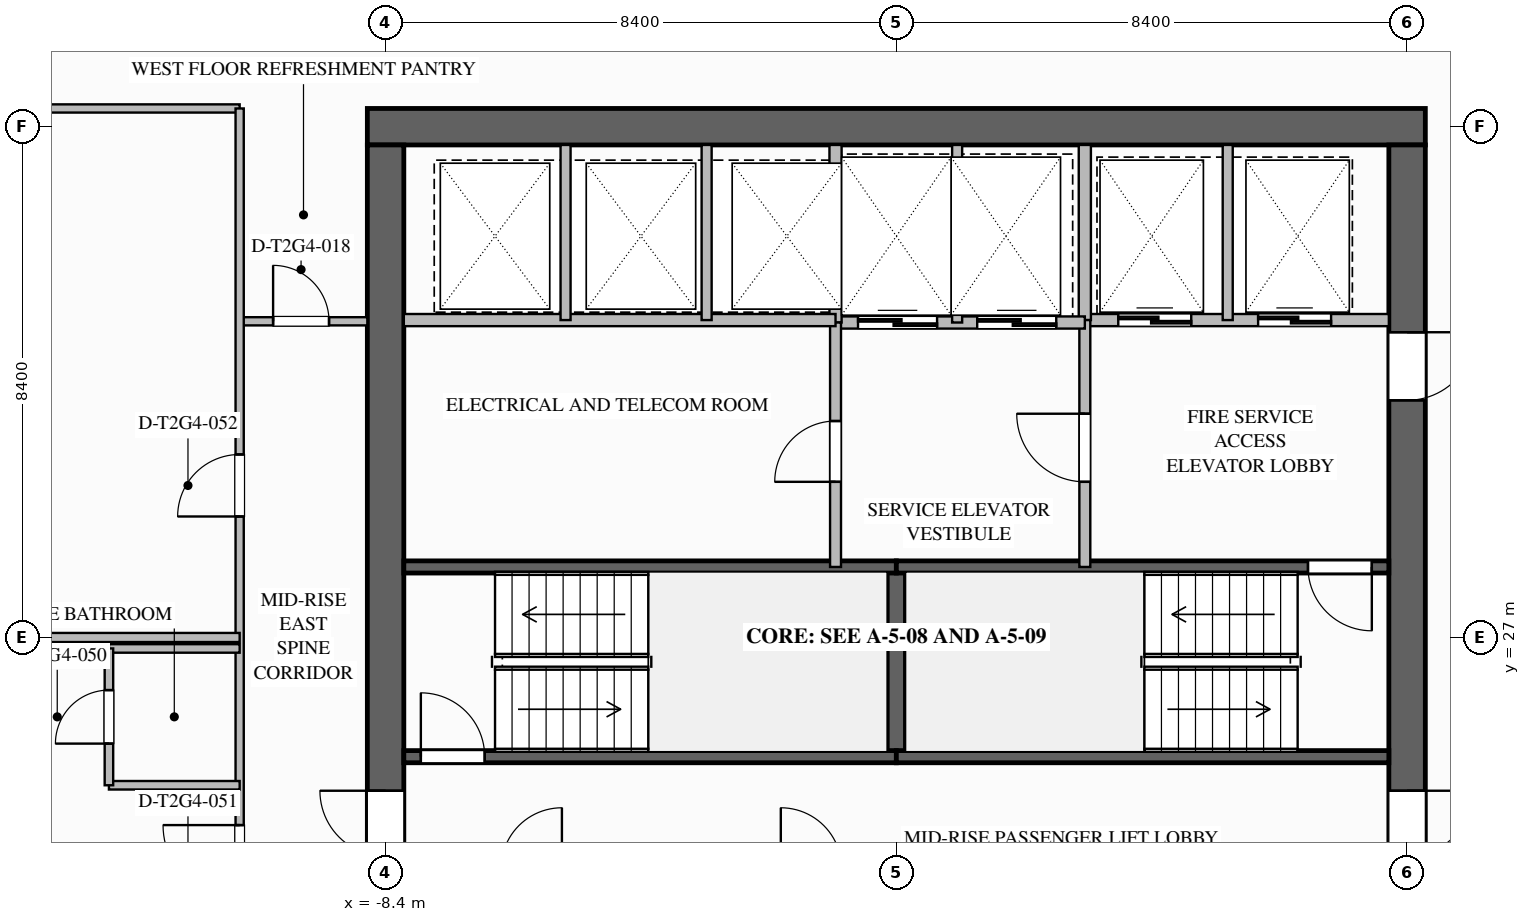
"""IFC4 building model, lengths in metres.
Left out: names, types, materials, properties, quantities, classifications, styles, units other than length and angle.
Written with IfcOpenShell. Run it as: python <this file> out.ifc"""

import sys

from ifc_helpers import new_model, si_unit, direction, frame, frame_2d, origin, place, context, subcontext, project, spatial, rectangle, extrude, element, fill, save


model = new_model("IFC4")
c1 = context("Model", 3, precision=1e-05, world=origin(), true_north=direction((0.0, 1.0)))
c2 = subcontext(c1, "Body", "Model", "MODEL_VIEW")
j1 = project(units=[si_unit("LENGTHUNIT", "METRE"), si_unit("PLANEANGLEUNIT", "RADIAN")], contexts=[c1])
p1 = place(None, origin())
s1 = spatial("IfcSite", under=j1, at=p1, CompositionType="ELEMENT")
p2 = place(p1, origin())
s2 = spatial("IfcBuilding", under=s1, at=p2, CompositionType="ELEMENT")
p3 = place(p2, frame((0.0, 0.0, 123.3)))
s3 = spatial("IfcBuildingStorey", under=s2, at=p3, CompositionType="ELEMENT", Elevation=123.3)
p4 = place(p3, frame((-8.7, 35.4, 0.0), z_axis=(0.0, 0.0, 1.0), x_axis=(1.0, 0.0, 0.0)))
e1 = element("IfcWall", 1, at=p4, inside=s3, PredefinedType="SHEAR", context=c2, shape_type="SweptSolid", body=[
    extrude(rectangle(XDim=17.4, YDim=0.6, at=frame_2d((8.7, 0.0))), origin(), (0.0, 0.0, 1.0), 3.5),
])
p5 = place(p3, frame((8.4, 35.1, 0.0), z_axis=(0.0, 0.0, 1.0), x_axis=(0.0, -1.0, 0.0)))
e2 = element("IfcWall", 2, at=p5, inside=s3, PredefinedType="SHEAR", context=c2, shape_type="SweptSolid", body=[
    extrude(rectangle(XDim=16.2, YDim=0.6, at=frame_2d((8.1, 0.0))), origin(), (0.0, 0.0, 1.0), 3.5),
])
p6 = place(p5, frame((3.08, 0.0, 0.0)))
e3 = element("IfcOpeningElement", 3, at=p6, cuts=e2, PredefinedType="OPENING", context=c2, shape_type="SweptSolid", body=[
    extrude(rectangle(XDim=1.12, YDim=2.1, at=frame_2d((0.56, 1.05))), frame((0.0, 0.31, 0.0), z_axis=(0.0, -1.0, 0.0), x_axis=(1.0, 0.0, 0.0)), (0.0, 0.0, 1.0), 0.62),
])
p7 = place(p5, frame((10.62, 0.0, 0.0)))
e4 = element("IfcOpeningElement", 4, at=p7, cuts=e2, PredefinedType="OPENING", context=c2, shape_type="SweptSolid", body=[
    extrude(rectangle(XDim=1.08, YDim=2.04, at=frame_2d((0.54, 1.02))), frame((0.0, 0.31, 0.0), z_axis=(0.0, -1.0, 0.0), x_axis=(1.0, 0.0, 0.0)), (0.0, 0.0, 1.0), 0.62),
])
p8 = place(p3, frame((-8.4, 18.9, 0.0), z_axis=(0.0, 0.0, 1.0), x_axis=(0.0, 1.0, 0.0)))
e5 = element("IfcWall", 5, at=p8, inside=s3, PredefinedType="SHEAR", context=c2, shape_type="SweptSolid", body=[
    extrude(rectangle(XDim=16.2, YDim=0.6, at=frame_2d((8.1, 0.0))), origin(), (0.0, 0.0, 1.0), 3.5),
])
p9 = place(p8, frame((4.5, 0.0, 0.0)))
e6 = element("IfcOpeningElement", 6, at=p9, cuts=e5, PredefinedType="OPENING", context=c2, shape_type="SweptSolid", body=[
    extrude(rectangle(XDim=1.08, YDim=2.04, at=frame_2d((0.54, 1.02))), frame((0.0, 0.31, 0.0), z_axis=(0.0, -1.0, 0.0), x_axis=(1.0, 0.0, 0.0)), (0.0, 0.0, 1.0), 0.62),
])
p10 = place(p3, frame((0.0, 25.04, 0.0), z_axis=(0.0, 0.0, 1.0), x_axis=(0.0, 1.0, 0.0)))
e7 = element("IfcWall", 7, at=p10, inside=s3, PredefinedType="SOLIDWALL", context=c2, shape_type="SweptSolid", body=[
    extrude(rectangle(XDim=3.12, YDim=0.3, at=frame_2d((1.56, 0.0))), origin(), (0.0, 0.0, 1.0), 3.24),
])
p11 = place(p3, frame((-8.1, 25.04, 0.0), z_axis=(0.0, 0.0, 1.0), x_axis=(1.0, 0.0, 0.0)))
e8 = element("IfcWall", 8, at=p11, inside=s3, PredefinedType="SOLIDWALL", context=c2, shape_type="SweptSolid", body=[
    extrude(rectangle(XDim=8.1, YDim=0.2, at=frame_2d((4.05, 0.0))), origin(), (0.0, 0.0, 1.0), 3.24),
])
p12 = place(p11, frame((0.28, 0.0, 0.0)))
e9 = element("IfcOpeningElement", 9, at=p12, cuts=e8, PredefinedType="OPENING", context=c2, shape_type="SweptSolid", body=[
    extrude(rectangle(XDim=1.05, YDim=2.1, at=frame_2d((0.525, 1.05))), frame((0.0, 0.11, 0.0), z_axis=(0.0, -1.0, 0.0), x_axis=(1.0, 0.0, 0.0)), (0.0, 0.0, 1.0), 0.22),
])
for number, where, z_axis, x_axis in (
    (10, (-8.1, 28.16, 0.0), (0.0, 0.0, 1.0), (1.0, 0.0, 0.0)),
    (11, (0.0, 25.04, 0.0), (0.0, 0.0, 1.0), (1.0, 0.0, 0.0)),
):
    element("IfcWall", number, at=place(p3, frame(where, z_axis=z_axis, x_axis=x_axis)), inside=s3, PredefinedType="SOLIDWALL", context=c2, shape_type="SweptSolid", body=[
        extrude(rectangle(XDim=8.1, YDim=0.2, at=frame_2d((4.05, 0.0))), origin(), (0.0, 0.0, 1.0), 3.24),
    ])
p13 = place(p3, frame((8.1, 28.16, 0.0), z_axis=(0.0, 0.0, 1.0), x_axis=(-1.0, 0.0, 0.0)))
e12 = element("IfcWall", 12, at=p13, inside=s3, PredefinedType="SOLIDWALL", context=c2, shape_type="SweptSolid", body=[
    extrude(rectangle(XDim=8.1, YDim=0.2, at=frame_2d((4.05, 0.0))), origin(), (0.0, 0.0, 1.0), 3.24),
])
p14 = place(p13, frame((0.28, 0.0, 0.0)))
e13 = element("IfcOpeningElement", 13, at=p14, cuts=e12, PredefinedType="OPENING", context=c2, shape_type="SweptSolid", body=[
    extrude(rectangle(XDim=1.05, YDim=2.1, at=frame_2d((0.525, 1.05))), frame((0.0, 0.11, 0.0), z_axis=(0.0, -1.0, 0.0), x_axis=(1.0, 0.0, 0.0)), (0.0, 0.0, 1.0), 0.22),
])
p15 = place(p3, frame((3.1, 32.22, 0.0), z_axis=(0.0, 0.0, 1.0), x_axis=(1.0, 0.0, 0.0)))
e14 = element("IfcWall", 14, at=p15, inside=s3, PredefinedType="SOLIDWALL", context=c2, shape_type="SweptSolid", body=[
    extrude(rectangle(XDim=5.0, YDim=0.2, at=frame_2d((2.5, 0.0))), origin(), (0.0, 0.0, 1.0), 3.24),
])
p16 = place(p15, frame((0.55, 0.0, 0.0)))
e15 = element("IfcOpeningElement", 15, at=p16, cuts=e14, PredefinedType="OPENING", context=c2, shape_type="SweptSolid", body=[
    extrude(rectangle(XDim=1.2, YDim=2.2, at=frame_2d((0.6, 1.1))), frame((0.0, 0.11, 0.0), z_axis=(0.0, -1.0, 0.0), x_axis=(1.0, 0.0, 0.0)), (0.0, 0.0, 1.0), 0.22),
])
p17 = place(p15, frame((2.85, 0.0, 0.0)))
e16 = element("IfcOpeningElement", 16, at=p17, cuts=e14, PredefinedType="OPENING", context=c2, shape_type="SweptSolid", body=[
    extrude(rectangle(XDim=1.2, YDim=2.2, at=frame_2d((0.6, 1.1))), frame((0.0, 0.11, 0.0), z_axis=(0.0, -1.0, 0.0), x_axis=(1.0, 0.0, 0.0)), (0.0, 0.0, 1.0), 0.22),
])
p18 = place(p3, frame((3.1, 32.22, 0.0), z_axis=(0.0, 0.0, 1.0), x_axis=(0.0, 1.0, 0.0)))
e17 = element("IfcWall", 17, at=p18, inside=s3, PredefinedType="SOLIDWALL", context=c2, shape_type="SweptSolid", body=[
    extrude(rectangle(XDim=2.88, YDim=0.2, at=frame_2d((1.44, 0.0))), origin(), (0.0, 0.0, 1.0), 3.24),
])
p19 = place(p3, frame((5.45, 32.22, 0.0), z_axis=(0.0, 0.0, 1.0), x_axis=(0.0, 1.0, 0.0)))
e18 = element("IfcWall", 18, at=p19, inside=s3, PredefinedType="PARTITIONING", context=c2, shape_type="SweptSolid", body=[
    extrude(rectangle(XDim=2.88, YDim=0.165, at=frame_2d((1.44, 0.0))), origin(), (0.0, 0.0, 1.0), 3.24),
])
p20 = place(p3, frame((3.1, 28.16, 0.0), z_axis=(0.0, 0.0, 1.0), x_axis=(0.0, 1.0, 0.0)))
e19 = element("IfcWall", 19, at=p20, inside=s3, PredefinedType="SOLIDWALL", context=c2, shape_type="SweptSolid", body=[
    extrude(rectangle(XDim=4.06, YDim=0.18, at=frame_2d((2.03, 0.0))), origin(), (0.0, 0.0, 1.0), 3.24),
])
p21 = place(p20, frame((1.4, 0.0, 0.0)))
e20 = element("IfcOpeningElement", 20, at=p21, cuts=e19, PredefinedType="OPENING", context=c2, shape_type="SweptSolid", body=[
    extrude(rectangle(XDim=1.12, YDim=2.1, at=frame_2d((0.56, 1.05))), frame((0.0, 0.1, 0.0), z_axis=(0.0, -1.0, 0.0), x_axis=(1.0, 0.0, 0.0)), (0.0, 0.0, 1.0), 0.2),
])
p22 = place(p3, frame((-1.0, 32.18, 0.0), z_axis=(0.0, 0.0, 1.0), x_axis=(1.0, 0.0, 0.0)))
e21 = element("IfcWall", 21, at=p22, inside=s3, PredefinedType="SOLIDWALL", context=c2, shape_type="SweptSolid", body=[
    extrude(rectangle(XDim=4.1, YDim=0.2, at=frame_2d((2.05, 0.0))), origin(), (0.0, 0.0, 1.0), 3.24),
])
p23 = place(p22, frame((0.37, 0.0, 0.0)))
e22 = element("IfcOpeningElement", 22, at=p23, cuts=e21, PredefinedType="OPENING", context=c2, shape_type="SweptSolid", body=[
    extrude(rectangle(XDim=1.3, YDim=2.2, at=frame_2d((0.65, 1.1))), frame((0.0, 0.11, 0.0), z_axis=(0.0, -1.0, 0.0), x_axis=(1.0, 0.0, 0.0)), (0.0, 0.0, 1.0), 0.22),
])
p24 = place(p22, frame((2.33, 0.0, 0.0)))
e23 = element("IfcOpeningElement", 23, at=p24, cuts=e21, PredefinedType="OPENING", context=c2, shape_type="SweptSolid", body=[
    extrude(rectangle(XDim=1.3, YDim=2.2, at=frame_2d((0.65, 1.1))), frame((0.0, 0.11, 0.0), z_axis=(0.0, -1.0, 0.0), x_axis=(1.0, 0.0, 0.0)), (0.0, 0.0, 1.0), 0.22),
])
p25 = place(p3, frame((-1.0, 32.18, 0.0), z_axis=(0.0, 0.0, 1.0), x_axis=(0.0, 1.0, 0.0)))
e24 = element("IfcWall", 24, at=p25, inside=s3, PredefinedType="SOLIDWALL", context=c2, shape_type="SweptSolid", body=[
    extrude(rectangle(XDim=2.92, YDim=0.2, at=frame_2d((1.46, 0.0))), origin(), (0.0, 0.0, 1.0), 3.24),
])
p26 = place(p3, frame((1.0, 32.18, 0.0), z_axis=(0.0, 0.0, 1.0), x_axis=(0.0, 1.0, 0.0)))
e25 = element("IfcWall", 25, at=p26, inside=s3, PredefinedType="PARTITIONING", context=c2, shape_type="SweptSolid", body=[
    extrude(rectangle(XDim=2.92, YDim=0.165, at=frame_2d((1.46, 0.0))), origin(), (0.0, 0.0, 1.0), 3.24),
])
p27 = place(p3, frame((-1.0, 28.16, 0.0), z_axis=(0.0, 0.0, 1.0), x_axis=(0.0, 1.0, 0.0)))
e26 = element("IfcWall", 26, at=p27, inside=s3, PredefinedType="SOLIDWALL", context=c2, shape_type="SweptSolid", body=[
    extrude(rectangle(XDim=4.02, YDim=0.18, at=frame_2d((2.01, 0.0))), origin(), (0.0, 0.0, 1.0), 3.24),
])
p28 = place(p27, frame((1.4, 0.0, 0.0)))
e27 = element("IfcOpeningElement", 27, at=p28, cuts=e26, PredefinedType="OPENING", context=c2, shape_type="SweptSolid", body=[
    extrude(rectangle(XDim=1.0, YDim=2.1, at=frame_2d((0.5, 1.05))), frame((0.0, 0.1, 0.0), z_axis=(0.0, -1.0, 0.0), x_axis=(1.0, 0.0, 0.0)), (0.0, 0.0, 1.0), 0.2),
])
p29 = place(p3, frame((-8.1, 32.22, 0.0), z_axis=(0.0, 0.0, 1.0), x_axis=(1.0, 0.0, 0.0)))
e28 = element("IfcWall", 28, at=p29, inside=s3, PredefinedType="SOLIDWALL", context=c2, shape_type="SweptSolid", body=[
    extrude(rectangle(XDim=7.1, YDim=0.2, at=frame_2d((3.55, 0.0))), origin(), (0.0, 0.0, 1.0), 3.24),
])
for number, where, z_axis, x_axis in (
    (29, (-5.44, 32.22, 0.0), (0.0, 0.0, 1.0), (0.0, 1.0, 0.0)),
    (30, (-3.12, 32.22, 0.0), (0.0, 0.0, 1.0), (0.0, 1.0, 0.0)),
):
    element("IfcWall", number, at=place(p3, frame(where, z_axis=z_axis, x_axis=x_axis)), inside=s3, PredefinedType="PARTITIONING", context=c2, shape_type="SweptSolid", body=[
        extrude(rectangle(XDim=2.88, YDim=0.165, at=frame_2d((1.44, 0.0))), origin(), (0.0, 0.0, 1.0), 3.24),
    ])
p30 = place(p3, frame((-10.8, 32.2, 0.0), z_axis=(0.0, 0.0, 1.0), x_axis=(1.0, 0.0, 0.0)))
e31 = element("IfcWall", 31, at=p30, inside=s3, PredefinedType="PARTITIONING", context=c2, shape_type="SweptSolid", body=[
    extrude(rectangle(XDim=2.1, YDim=0.135, at=frame_2d((1.05, 0.0))), origin(), (0.0, 0.0, 1.0), 3.24),
])
p31 = place(p30, frame((0.55, 0.0, 0.0)))
e32 = element("IfcOpeningElement", 32, at=p31, cuts=e31, PredefinedType="OPENING", context=c2, shape_type="SweptSolid", body=[
    extrude(rectangle(XDim=0.92, YDim=2.1, at=frame_2d((0.46, 1.05))), frame((0.0, 0.077, 0.0), z_axis=(0.0, -1.0, 0.0), x_axis=(1.0, 0.0, 0.0)), (0.0, 0.0, 1.0), 0.155),
])
p32 = place(p3, frame((-16.2, 35.7, 0.0), z_axis=(0.0, 0.0, 1.0), x_axis=(1.0, 0.0, 0.0)))
e33 = element("IfcWall", 33, at=p32, inside=s3, PredefinedType="PARTITIONING", context=c2, shape_type="SweptSolid", body=[
    extrude(rectangle(XDim=5.4, YDim=0.135, at=frame_2d((2.7, 0.0))), origin(), (0.0, 0.0, 1.0), 3.24),
])
p33 = place(p3, frame((-10.8, 18.3, 0.0), z_axis=(0.0, 0.0, 1.0), x_axis=(0.0, 1.0, 0.0)))
e34 = element("IfcWall", 34, at=p33, inside=s3, PredefinedType="PARTITIONING", context=c2, shape_type="SweptSolid", body=[
    extrude(rectangle(XDim=17.4, YDim=0.135, at=frame_2d((8.7, 0.0))), origin(), (0.0, 0.0, 1.0), 3.24),
])
p34 = place(p33, frame((4.355, 0.0, 0.0)))
e35 = element("IfcOpeningElement", 35, at=p34, cuts=e34, PredefinedType="OPENING", context=c2, shape_type="SweptSolid", body=[
    extrude(rectangle(XDim=1.26, YDim=2.2, at=frame_2d((0.63, 1.1))), frame((0.0, 0.077, 0.0), z_axis=(0.0, -1.0, 0.0), x_axis=(1.0, 0.0, 0.0)), (0.0, 0.0, 1.0), 0.155),
])
p35 = place(p33, frame((10.69, 0.0, 0.0)))
e36 = element("IfcOpeningElement", 36, at=p35, cuts=e34, PredefinedType="OPENING", context=c2, shape_type="SweptSolid", body=[
    extrude(rectangle(XDim=1.02, YDim=2.15, at=frame_2d((0.51, 1.075))), frame((0.0, 0.077, 0.0), z_axis=(0.0, -1.0, 0.0), x_axis=(1.0, 0.0, 0.0)), (0.0, 0.0, 1.0), 0.155),
])
p36 = place(p3, frame((-26.2, 27.0, 0.0), z_axis=(0.0, 0.0, 1.0), x_axis=(1.0, 0.0, 0.0)))
e37 = element("IfcWall", 37, at=p36, inside=s3, PredefinedType="PARTITIONING", context=c2, shape_type="SweptSolid", body=[
    extrude(rectangle(XDim=15.4, YDim=0.15, at=frame_2d((7.7, 0.0))), origin(), (0.0, 0.0, 1.0), 2.53),
])
p37 = place(p3, frame((-10.8, 24.57, 0.0), z_axis=(0.0, 0.0, 1.0), x_axis=(-1.0, 0.0, 0.0)))
e38 = element("IfcWall", 38, at=p37, inside=s3, PredefinedType="PLUMBINGWALL", context=c2, shape_type="SweptSolid", body=[
    extrude(rectangle(XDim=2.15, YDim=0.14, at=frame_2d((1.075, 0.0))), origin(), (0.0, 0.0, 1.0), 3.24),
])
p38 = place(p3, frame((-10.8, 26.82, 0.0), z_axis=(0.0, 0.0, 1.0), x_axis=(-1.0, 0.0, 0.0)))
e39 = element("IfcWall", 39, at=p38, inside=s3, PredefinedType="PLUMBINGWALL", context=c2, shape_type="SweptSolid", body=[
    extrude(rectangle(XDim=2.15, YDim=0.14, at=frame_2d((1.075, 0.0))), origin(), (0.0, 0.0, 1.0), 2.617),
])
p39 = place(p3, frame((-12.95, 24.57, 0.0), z_axis=(0.0, 0.0, 1.0), x_axis=(0.0, 1.0, 0.0)))
e40 = element("IfcWall", 40, at=p39, inside=s3, PredefinedType="PLUMBINGWALL", context=c2, shape_type="SweptSolid", body=[
    extrude(rectangle(XDim=2.25, YDim=0.14, at=frame_2d((1.125, 0.0))), origin(), (0.0, 0.0, 1.0), 3.24),
])
p40 = place(p39, frame((0.685, 0.0, 0.0)))
e41 = element("IfcOpeningElement", 41, at=p40, cuts=e40, PredefinedType="OPENING", context=c2, shape_type="SweptSolid", body=[
    extrude(rectangle(XDim=0.88, YDim=2.1, at=frame_2d((0.44, 1.05))), frame((0.0, 0.08, 0.0), z_axis=(0.0, -1.0, 0.0), x_axis=(1.0, 0.0, 0.0)), (0.0, 0.0, 1.0), 0.16),
])
p41 = place(p12, origin())
e42 = element("IfcDoor", 42, at=p41, inside=s3, OperationType="SINGLE_SWING_LEFT", PredefinedType="DOOR", context=c2, shape_type="SweptSolid", body=[
    extrude(rectangle(XDim=1.05, YDim=2.1, at=frame_2d((0.525, 1.05))), frame((0.0, 0.025, 0.0), z_axis=(0.0, -1.0, 0.0), x_axis=(1.0, 0.0, 0.0)), (0.0, 0.0, 1.0), 0.05),
])
fill(e9, e42)
p42 = place(p14, origin())
e43 = element("IfcDoor", 43, at=p42, inside=s3, OperationType="SINGLE_SWING_LEFT", PredefinedType="DOOR", context=c2, shape_type="SweptSolid", body=[
    extrude(rectangle(XDim=1.05, YDim=2.1, at=frame_2d((0.525, 1.05))), frame((0.0, 0.025, 0.0), z_axis=(0.0, -1.0, 0.0), x_axis=(1.0, 0.0, 0.0)), (0.0, 0.0, 1.0), 0.05),
])
fill(e13, e43)
p43 = place(p16, origin())
e44 = element("IfcDoor", 44, at=p43, inside=s3, OperationType="SLIDING_TO_LEFT", PredefinedType="DOOR", context=c2, shape_type="SweptSolid", body=[
    extrude(rectangle(XDim=1.2, YDim=2.2, at=frame_2d((0.6, 1.1))), frame((0.0, 0.025, 0.0), z_axis=(0.0, -1.0, 0.0), x_axis=(1.0, 0.0, 0.0)), (0.0, 0.0, 1.0), 0.05),
])
fill(e15, e44)
p44 = place(p17, origin())
e45 = element("IfcDoor", 45, at=p44, inside=s3, OperationType="SLIDING_TO_LEFT", PredefinedType="DOOR", context=c2, shape_type="SweptSolid", body=[
    extrude(rectangle(XDim=1.2, YDim=2.2, at=frame_2d((0.6, 1.1))), frame((0.0, 0.025, 0.0), z_axis=(0.0, -1.0, 0.0), x_axis=(1.0, 0.0, 0.0)), (0.0, 0.0, 1.0), 0.05),
])
fill(e16, e45)
p45 = place(p21, origin())
e46 = element("IfcDoor", 46, at=p45, inside=s3, OperationType="SINGLE_SWING_RIGHT", PredefinedType="DOOR", context=c2, shape_type="SweptSolid", body=[
    extrude(rectangle(XDim=1.12, YDim=2.1, at=frame_2d((0.56, 1.05))), frame((0.0, 0.025, 0.0), z_axis=(0.0, -1.0, 0.0), x_axis=(1.0, 0.0, 0.0)), (0.0, 0.0, 1.0), 0.05),
])
fill(e20, e46)
p46 = place(p6, origin())
e47 = element("IfcDoor", 47, at=p46, inside=s3, OperationType="SINGLE_SWING_LEFT", PredefinedType="DOOR", context=c2, shape_type="SweptSolid", body=[
    extrude(rectangle(XDim=1.12, YDim=2.1, at=frame_2d((0.56, 1.05))), frame((0.0, 0.025, 0.0), z_axis=(0.0, -1.0, 0.0), x_axis=(1.0, 0.0, 0.0)), (0.0, 0.0, 1.0), 0.05),
])
fill(e3, e47)
p47 = place(p23, origin())
e48 = element("IfcDoor", 48, at=p47, inside=s3, OperationType="SLIDING_TO_LEFT", PredefinedType="DOOR", context=c2, shape_type="SweptSolid", body=[
    extrude(rectangle(XDim=1.3, YDim=2.2, at=frame_2d((0.65, 1.1))), frame((0.0, 0.025, 0.0), z_axis=(0.0, -1.0, 0.0), x_axis=(1.0, 0.0, 0.0)), (0.0, 0.0, 1.0), 0.05),
])
fill(e22, e48)
p48 = place(p24, origin())
e49 = element("IfcDoor", 49, at=p48, inside=s3, OperationType="SLIDING_TO_LEFT", PredefinedType="DOOR", context=c2, shape_type="SweptSolid", body=[
    extrude(rectangle(XDim=1.3, YDim=2.2, at=frame_2d((0.65, 1.1))), frame((0.0, 0.025, 0.0), z_axis=(0.0, -1.0, 0.0), x_axis=(1.0, 0.0, 0.0)), (0.0, 0.0, 1.0), 0.05),
])
fill(e23, e49)
p49 = place(p28, origin())
e50 = element("IfcDoor", 50, at=p49, inside=s3, OperationType="SINGLE_SWING_LEFT", PredefinedType="DOOR", context=c2, shape_type="SweptSolid", body=[
    extrude(rectangle(XDim=1.0, YDim=2.1, at=frame_2d((0.5, 1.05))), frame((0.0, 0.025, 0.0), z_axis=(0.0, -1.0, 0.0), x_axis=(1.0, 0.0, 0.0)), (0.0, 0.0, 1.0), 0.05),
])
fill(e27, e50)
p50 = place(p9, origin())
e51 = element("IfcDoor", 51, at=p50, inside=s3, OperationType="SINGLE_SWING_RIGHT", PredefinedType="DOOR", context=c2, shape_type="SweptSolid", body=[
    extrude(rectangle(XDim=1.08, YDim=2.04, at=frame_2d((0.54, 1.02))), frame((0.0, 0.025, 0.0), z_axis=(0.0, -1.0, 0.0), x_axis=(1.0, 0.0, 0.0)), (0.0, 0.0, 1.0), 0.05),
])
fill(e6, e51)
p51 = place(p7, origin())
e52 = element("IfcDoor", 52, at=p51, inside=s3, OperationType="SINGLE_SWING_LEFT", PredefinedType="DOOR", context=c2, shape_type="SweptSolid", body=[
    extrude(rectangle(XDim=1.08, YDim=2.04, at=frame_2d((0.54, 1.02))), frame((0.0, 0.025, 0.0), z_axis=(0.0, -1.0, 0.0), x_axis=(1.0, 0.0, 0.0)), (0.0, 0.0, 1.0), 0.05),
])
fill(e4, e52)
p52 = place(p31, origin())
e53 = element("IfcDoor", 53, at=p52, inside=s3, OperationType="SINGLE_SWING_LEFT", PredefinedType="DOOR", context=c2, shape_type="SweptSolid", body=[
    extrude(rectangle(XDim=0.92, YDim=2.1, at=frame_2d((0.46, 1.05))), frame((0.0, 0.025, 0.0), z_axis=(0.0, -1.0, 0.0), x_axis=(1.0, 0.0, 0.0)), (0.0, 0.0, 1.0), 0.05),
])
fill(e32, e53)
p53 = place(p40, origin())
e54 = element("IfcDoor", 54, at=p53, inside=s3, OperationType="SINGLE_SWING_LEFT", PredefinedType="DOOR", context=c2, shape_type="SweptSolid", body=[
    extrude(rectangle(XDim=0.88, YDim=2.1, at=frame_2d((0.44, 1.05))), frame((0.0, 0.025, 0.0), z_axis=(0.0, -1.0, 0.0), x_axis=(1.0, 0.0, 0.0)), (0.0, 0.0, 1.0), 0.05),
])
fill(e41, e54)
p54 = place(p34, origin())
e55 = element("IfcDoor", 55, at=p54, inside=s3, OperationType="SINGLE_SWING_RIGHT", PredefinedType="DOOR", context=c2, shape_type="SweptSolid", body=[
    extrude(rectangle(XDim=1.26, YDim=2.2, at=frame_2d((0.63, 1.1))), frame((0.0, 0.025, 0.0), z_axis=(0.0, -1.0, 0.0), x_axis=(1.0, 0.0, 0.0)), (0.0, 0.0, 1.0), 0.05),
])
fill(e35, e55)
p55 = place(p35, origin())
e56 = element("IfcDoor", 56, at=p55, inside=s3, OperationType="SINGLE_SWING_LEFT", PredefinedType="DOOR", context=c2, shape_type="SweptSolid", body=[
    extrude(rectangle(XDim=1.02, YDim=2.15, at=frame_2d((0.51, 1.075))), frame((0.0, 0.025, 0.0), z_axis=(0.0, -1.0, 0.0), x_axis=(1.0, 0.0, 0.0)), (0.0, 0.0, 1.0), 0.05),
])
fill(e36, e56)
save(model, sys.argv[1])
